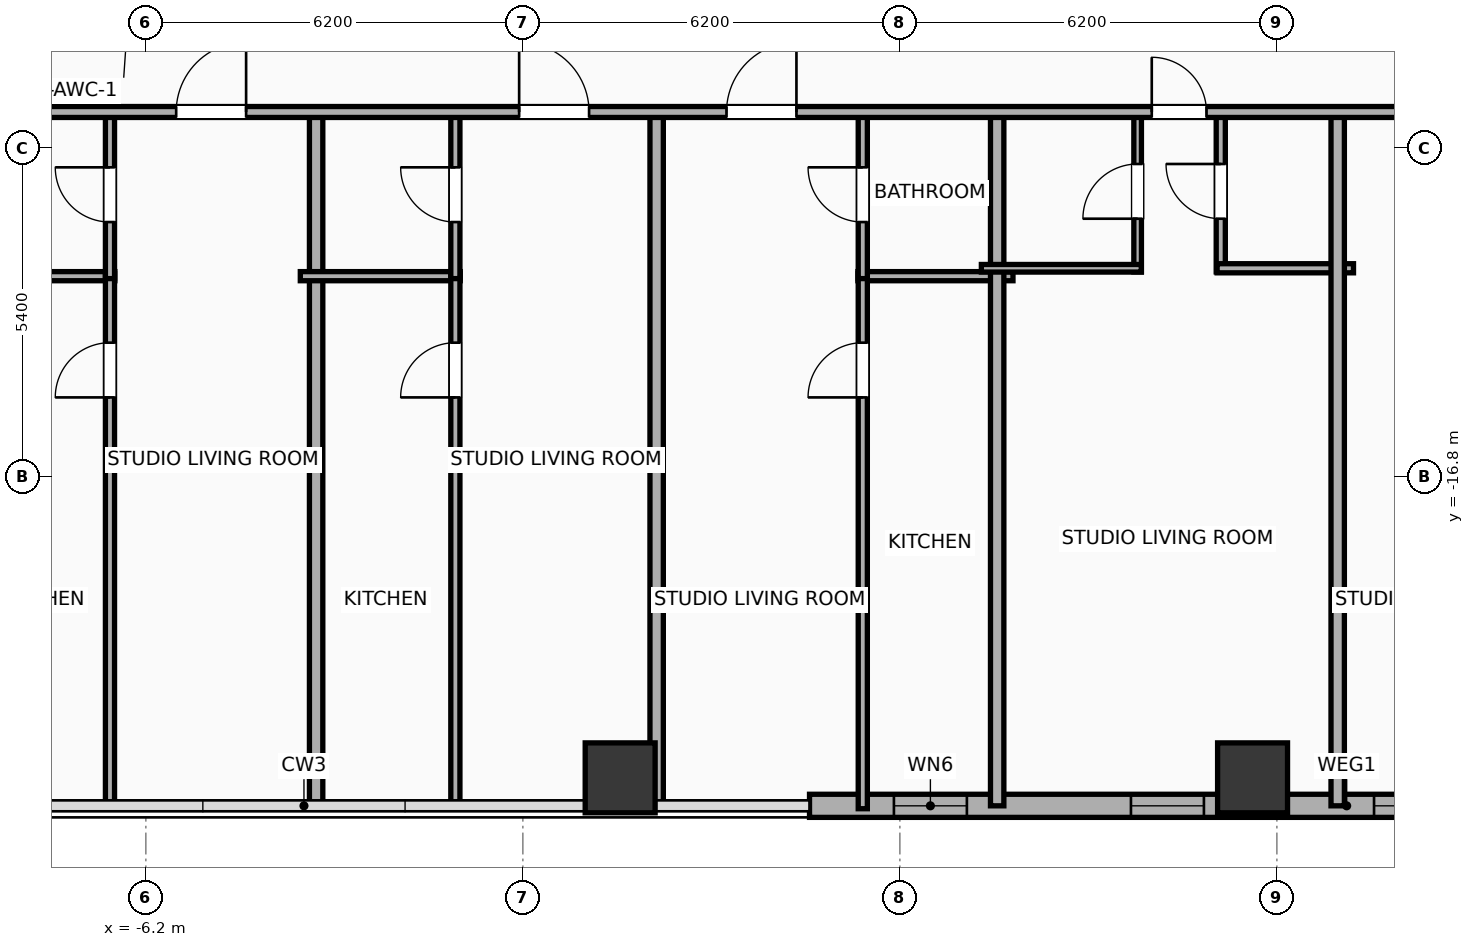
"""IFC4 building model, lengths in metres.
Left out: names, types, materials, properties, quantities, classifications, styles, units other than length and angle.
Written with IfcOpenShell. Run it as: python <this file> out.ifc"""

import sys

from ifc_helpers import new_model, si_unit, direction, frame, frame_2d, origin, origin_2d, place, context, subcontext, project, spatial, rectangle, hollow_rectangle, extrude, element, fill, save


model = new_model("IFC4")
c1 = context("Model", 3, precision=1e-05, world=origin(), true_north=direction((0.0, 1.0)))
c2 = subcontext(c1, "Body", "Model", "MODEL_VIEW")
j1 = project(units=[si_unit("LENGTHUNIT", "METRE"), si_unit("PLANEANGLEUNIT", "RADIAN")], contexts=[c1])
p1 = place(None, origin())
s1 = spatial("IfcSite", under=j1, at=p1, CompositionType="ELEMENT")
p2 = place(p1, origin())
s2 = spatial("IfcBuilding", under=s1, at=p2, CompositionType="ELEMENT")
p3 = place(p2, frame((0.0, 0.0, 61.1)))
s3 = spatial("IfcBuildingStorey", under=s2, at=p3, CompositionType="ELEMENT", Elevation=61.1)
for number, where, z_axis, x_axis in (
    (1, (1.6, -21.75, 0.0), (0.0, 0.0, 1.0), (1.0, 0.0, 0.0)),
    (2, (12.0, -21.75, 0.0), (0.0, 0.0, 1.0), (1.0, 0.0, 0.0)),
):
    element("IfcColumn", number, at=place(p3, frame(where, z_axis=z_axis, x_axis=x_axis)), inside=s3, PredefinedType="COLUMN", context=c2, shape_type="SweptSolid", body=[
        extrude(hollow_rectangle(XDim=1.15, YDim=1.15, WallThickness=0.04, at=origin_2d()), origin(), (0.0, 0.0, 1.0), 3.9),
    ])
p4 = place(p3, frame((22.381, -22.21, 0.0), z_axis=(0.0, 0.0, 1.0), x_axis=(-1.0, 0.0, 0.0)))
e3 = element("IfcWall", 3, at=p4, inside=s3, PredefinedType="ELEMENTEDWALL", context=c2, shape_type="SweptSolid", body=[
    extrude(rectangle(XDim=17.667, YDim=0.38, at=frame_2d((8.833, 0.0))), origin(), (0.0, 0.0, 1.0), 3.65),
])
p5 = place(p4, frame((5.984, 0.0, 0.75)))
e4 = element("IfcOpeningElement", 4, at=p5, cuts=e3, PredefinedType="OPENING", context=c2, shape_type="SweptSolid", body=[
    extrude(rectangle(XDim=2.4, YDim=2.1, at=frame_2d((1.2, 1.05))), frame((0.0, 0.2, 0.0), z_axis=(0.0, -1.0, 0.0), x_axis=(1.0, 0.0, 0.0)), (0.0, 0.0, 1.0), 0.4),
])
p6 = place(p4, frame((15.079, 0.0, 0.75)))
e5 = element("IfcOpeningElement", 5, at=p6, cuts=e3, PredefinedType="OPENING", context=c2, shape_type="SweptSolid", body=[
    extrude(rectangle(XDim=1.2, YDim=2.05, at=frame_2d((0.6, 1.025))), frame((0.0, 0.2, 0.0), z_axis=(0.0, -1.0, 0.0), x_axis=(1.0, 0.0, 0.0)), (0.0, 0.0, 1.0), 0.4),
])
p7 = place(p4, frame((11.181, 0.0, 0.75)))
e6 = element("IfcOpeningElement", 6, at=p7, cuts=e3, PredefinedType="OPENING", context=c2, shape_type="SweptSolid", body=[
    extrude(rectangle(XDim=1.2, YDim=2.05, at=frame_2d((0.6, 1.025))), frame((0.0, 0.2, 0.0), z_axis=(0.0, -1.0, 0.0), x_axis=(1.0, 0.0, 0.0)), (0.0, 0.0, 1.0), 0.4),
])
p8 = place(p4, frame((3.886, 0.0, 0.75)))
e7 = element("IfcOpeningElement", 7, at=p8, cuts=e3, PredefinedType="OPENING", context=c2, shape_type="SweptSolid", body=[
    extrude(rectangle(XDim=1.2, YDim=2.05, at=frame_2d((0.6, 1.025))), frame((0.0, 0.2, 0.0), z_axis=(0.0, -1.0, 0.0), x_axis=(1.0, 0.0, 0.0)), (0.0, 0.0, 1.0), 0.4),
])
p9 = place(p4, frame((1.536, 0.0, 0.75)))
e8 = element("IfcOpeningElement", 8, at=p9, cuts=e3, PredefinedType="OPENING", context=c2, shape_type="SweptSolid", body=[
    extrude(rectangle(XDim=1.2, YDim=2.05, at=frame_2d((0.6, 1.025))), frame((0.0, 0.2, 0.0), z_axis=(0.0, -1.0, 0.0), x_axis=(1.0, 0.0, 0.0)), (0.0, 0.0, 1.0), 0.4),
])
p10 = place(p3, frame((-9.26, -13.5, 0.0), z_axis=(0.0, 0.0, 1.0), x_axis=(1.0, 0.0, 0.0)))
e9 = element("IfcWall", 9, at=p10, inside=s3, PredefinedType="PLUMBINGWALL", context=c2, shape_type="SweptSolid", body=[
    extrude(rectangle(XDim=2.55, YDim=0.15, at=frame_2d((1.275, 0.0))), origin(), (0.0, 0.0, 1.0), 3.65),
])
p11 = place(p3, frame((-6.79, -22.258, 0.0), z_axis=(0.0, 0.0, 1.0), x_axis=(0.0, 1.0, 0.0)))
e10 = element("IfcWall", 10, at=p11, inside=s3, PredefinedType="PLUMBINGWALL", context=c2, shape_type="SweptSolid", body=[
    extrude(rectangle(XDim=8.798, YDim=0.15, at=frame_2d((4.399, 0.0))), origin(), (0.0, 0.0, 1.0), 3.65),
])
p12 = place(p11, frame((6.764, 0.0, 0.0)))
e11 = element("IfcOpeningElement", 11, at=p12, cuts=e10, PredefinedType="OPENING", context=c2, shape_type="SweptSolid", body=[
    extrude(rectangle(XDim=0.9, YDim=2.05, at=frame_2d((0.45, 1.025))), frame((0.0, 0.085, 0.0), z_axis=(0.0, -1.0, 0.0), x_axis=(1.0, 0.0, 0.0)), (0.0, 0.0, 1.0), 0.17),
])
p13 = place(p3, frame((-6.79, -13.54, 0.0), z_axis=(0.0, 0.0, 1.0), x_axis=(0.0, 1.0, 0.0)))
e12 = element("IfcWall", 12, at=p13, inside=s3, PredefinedType="PLUMBINGWALL", context=c2, shape_type="SweptSolid", body=[
    extrude(rectangle(XDim=2.76, YDim=0.15, at=frame_2d((1.38, 0.0))), origin(), (0.0, 0.0, 1.0), 3.65),
])
p14 = place(p13, frame((0.93, 0.0, 0.0)))
e13 = element("IfcOpeningElement", 13, at=p14, cuts=e12, PredefinedType="OPENING", context=c2, shape_type="SweptSolid", body=[
    extrude(rectangle(XDim=0.9, YDim=2.05, at=frame_2d((0.45, 1.025))), frame((0.0, 0.085, 0.0), z_axis=(0.0, -1.0, 0.0), x_axis=(1.0, 0.0, 0.0)), (0.0, 0.0, 1.0), 0.17),
])
p15 = place(p3, frame((-3.4, -22.21, 0.0), z_axis=(0.0, 0.0, 1.0), x_axis=(0.0, 1.0, 0.0)))
e14 = element("IfcWall", 14, at=p15, inside=s3, PredefinedType="PARTITIONING", context=c2, shape_type="SweptSolid", body=[
    extrude(rectangle(XDim=11.49, YDim=0.22, at=frame_2d((5.745, 0.0))), origin(), (0.0, 0.0, 1.0), 3.65),
])
p16 = place(p3, frame((-3.66, -13.5, 0.0), z_axis=(0.0, 0.0, 1.0), x_axis=(1.0, 0.0, 0.0)))
e15 = element("IfcWall", 15, at=p16, inside=s3, PredefinedType="PLUMBINGWALL", context=c2, shape_type="SweptSolid", body=[
    extrude(rectangle(XDim=2.63, YDim=0.15, at=frame_2d((1.315, 0.0))), origin(), (0.0, 0.0, 1.0), 3.65),
])
p17 = place(p3, frame((-1.11, -22.258, 0.0), z_axis=(0.0, 0.0, 1.0), x_axis=(0.0, 1.0, 0.0)))
e16 = element("IfcWall", 16, at=p17, inside=s3, PredefinedType="PLUMBINGWALL", context=c2, shape_type="SweptSolid", body=[
    extrude(rectangle(XDim=8.798, YDim=0.15, at=frame_2d((4.399, 0.0))), origin(), (0.0, 0.0, 1.0), 3.65),
])
p18 = place(p17, frame((6.764, 0.0, 0.0)))
e17 = element("IfcOpeningElement", 17, at=p18, cuts=e16, PredefinedType="OPENING", context=c2, shape_type="SweptSolid", body=[
    extrude(rectangle(XDim=0.9, YDim=2.05, at=frame_2d((0.45, 1.025))), frame((0.0, 0.085, 0.0), z_axis=(0.0, -1.0, 0.0), x_axis=(1.0, 0.0, 0.0)), (0.0, 0.0, 1.0), 0.17),
])
p19 = place(p3, frame((-1.11, -13.54, 0.0), z_axis=(0.0, 0.0, 1.0), x_axis=(0.0, 1.0, 0.0)))
e18 = element("IfcWall", 18, at=p19, inside=s3, PredefinedType="PLUMBINGWALL", context=c2, shape_type="SweptSolid", body=[
    extrude(rectangle(XDim=2.76, YDim=0.15, at=frame_2d((1.38, 0.0))), origin(), (0.0, 0.0, 1.0), 3.65),
])
p20 = place(p19, frame((0.93, 0.0, 0.0)))
e19 = element("IfcOpeningElement", 19, at=p20, cuts=e18, PredefinedType="OPENING", context=c2, shape_type="SweptSolid", body=[
    extrude(rectangle(XDim=0.9, YDim=2.05, at=frame_2d((0.45, 1.025))), frame((0.0, 0.085, 0.0), z_axis=(0.0, -1.0, 0.0), x_axis=(1.0, 0.0, 0.0)), (0.0, 0.0, 1.0), 0.17),
])
p21 = place(p3, frame((2.2, -22.21, 0.0), z_axis=(0.0, 0.0, 1.0), x_axis=(0.0, 1.0, 0.0)))
e20 = element("IfcWall", 20, at=p21, inside=s3, PredefinedType="PARTITIONING", context=c2, shape_type="SweptSolid", body=[
    extrude(rectangle(XDim=11.49, YDim=0.22, at=frame_2d((5.745, 0.0))), origin(), (0.0, 0.0, 1.0), 2.94),
])
p22 = place(p3, frame((5.51, -13.5, 0.0), z_axis=(0.0, 0.0, 1.0), x_axis=(1.0, 0.0, 0.0)))
e21 = element("IfcWall", 21, at=p22, inside=s3, PredefinedType="PLUMBINGWALL", context=c2, shape_type="SweptSolid", body=[
    extrude(rectangle(XDim=2.55, YDim=0.15, at=frame_2d((1.275, 0.0))), origin(), (0.0, 0.0, 1.0), 3.65),
])
p23 = place(p3, frame((5.59, -22.258, 0.0), z_axis=(0.0, 0.0, 1.0), x_axis=(0.0, 1.0, 0.0)))
e22 = element("IfcWall", 22, at=p23, inside=s3, PredefinedType="PLUMBINGWALL", context=c2, shape_type="SweptSolid", body=[
    extrude(rectangle(XDim=8.798, YDim=0.15, at=frame_2d((4.399, 0.0))), origin(), (0.0, 0.0, 1.0), 3.65),
])
p24 = place(p23, frame((6.764, 0.0, 0.0)))
e23 = element("IfcOpeningElement", 23, at=p24, cuts=e22, PredefinedType="OPENING", context=c2, shape_type="SweptSolid", body=[
    extrude(rectangle(XDim=0.9, YDim=2.05, at=frame_2d((0.45, 1.025))), frame((0.0, 0.085, 0.0), z_axis=(0.0, -1.0, 0.0), x_axis=(1.0, 0.0, 0.0)), (0.0, 0.0, 1.0), 0.17),
])
p25 = place(p3, frame((5.59, -13.54, 0.0), z_axis=(0.0, 0.0, 1.0), x_axis=(0.0, 1.0, 0.0)))
e24 = element("IfcWall", 24, at=p25, inside=s3, PredefinedType="PLUMBINGWALL", context=c2, shape_type="SweptSolid", body=[
    extrude(rectangle(XDim=2.76, YDim=0.15, at=frame_2d((1.38, 0.0))), origin(), (0.0, 0.0, 1.0), 3.65),
])
p26 = place(p25, frame((0.93, 0.0, 0.0)))
e25 = element("IfcOpeningElement", 25, at=p26, cuts=e24, PredefinedType="OPENING", context=c2, shape_type="SweptSolid", body=[
    extrude(rectangle(XDim=0.9, YDim=2.05, at=frame_2d((0.45, 1.025))), frame((0.0, 0.085, 0.0), z_axis=(0.0, -1.0, 0.0), x_axis=(1.0, 0.0, 0.0)), (0.0, 0.0, 1.0), 0.17),
])
p27 = place(p3, frame((7.8, -22.21, 0.0), z_axis=(0.0, 0.0, 1.0), x_axis=(0.0, 1.0, 0.0)))
e26 = element("IfcWall", 26, at=p27, inside=s3, PredefinedType="PARTITIONING", context=c2, shape_type="SweptSolid", body=[
    extrude(rectangle(XDim=11.49, YDim=0.22, at=frame_2d((5.745, 0.0))), origin(), (0.0, 0.0, 1.0), 3.65),
])
p28 = place(p3, frame((10.11, -13.43, 0.0), z_axis=(0.0, 0.0, 1.0), x_axis=(0.0, 1.0, 0.0)))
e27 = element("IfcWall", 27, at=p28, inside=s3, PredefinedType="PARTITIONING", context=c2, shape_type="SweptSolid", body=[
    extrude(rectangle(XDim=2.65, YDim=0.125, at=frame_2d((1.325, 0.0))), origin(), (0.0, 0.0, 1.0), 3.65),
])
p29 = place(p28, frame((0.875, 0.0, 0.0)))
e28 = element("IfcOpeningElement", 28, at=p29, cuts=e27, PredefinedType="OPENING", context=c2, shape_type="SweptSolid", body=[
    extrude(rectangle(XDim=0.9, YDim=2.05, at=frame_2d((0.45, 1.025))), frame((0.0, 0.073, 0.0), z_axis=(0.0, -1.0, 0.0), x_axis=(1.0, 0.0, 0.0)), (0.0, 0.0, 1.0), 0.145),
])
p30 = place(p3, frame((11.477, -13.43, 0.0), z_axis=(0.0, 0.0, 1.0), x_axis=(0.0, 1.0, 0.0)))
e29 = element("IfcWall", 29, at=p30, inside=s3, PredefinedType="PLUMBINGWALL", context=c2, shape_type="SweptSolid", body=[
    extrude(rectangle(XDim=2.65, YDim=0.15, at=frame_2d((1.325, 0.0))), origin(), (0.0, 0.0, 1.0), 3.65),
])
p31 = place(p30, frame((0.875, 0.0, 0.0)))
e30 = element("IfcOpeningElement", 30, at=p31, cuts=e29, PredefinedType="OPENING", context=c2, shape_type="SweptSolid", body=[
    extrude(rectangle(XDim=0.9, YDim=2.05, at=frame_2d((0.45, 1.025))), frame((0.0, 0.085, 0.0), z_axis=(0.0, -1.0, 0.0), x_axis=(1.0, 0.0, 0.0)), (0.0, 0.0, 1.0), 0.17),
])
p32 = place(p3, frame((7.54, -13.37, 0.0), z_axis=(0.0, 0.0, 1.0), x_axis=(1.0, 0.0, 0.0)))
e31 = element("IfcWall", 31, at=p32, inside=s3, PredefinedType="PARTITIONING", context=c2, shape_type="SweptSolid", body=[
    extrude(rectangle(XDim=2.63, YDim=0.125, at=frame_2d((1.315, 0.0))), origin(), (0.0, 0.0, 1.0), 3.65),
])
p33 = place(p3, frame((11.417, -13.37, 0.0), z_axis=(0.0, 0.0, 1.0), x_axis=(1.0, 0.0, 0.0)))
e32 = element("IfcWall", 32, at=p33, inside=s3, PredefinedType="PLUMBINGWALL", context=c2, shape_type="SweptSolid", body=[
    extrude(rectangle(XDim=2.243, YDim=0.15, at=frame_2d((1.122, 0.0))), origin(), (0.0, 0.0, 1.0), 3.65),
])
p34 = place(p3, frame((13.4, -22.21, 0.0), z_axis=(0.0, 0.0, 1.0), x_axis=(0.0, 1.0, 0.0)))
e33 = element("IfcWall", 33, at=p34, inside=s3, PredefinedType="PARTITIONING", context=c2, shape_type="SweptSolid", body=[
    extrude(rectangle(XDim=11.49, YDim=0.22, at=frame_2d((5.745, 0.0))), origin(), (0.0, 0.0, 1.0), 3.65),
])
p35 = place(p3, frame((-33.41, -10.8, 0.0), z_axis=(0.0, 0.0, 1.0), x_axis=(1.0, 0.0, 0.0)))
e34 = element("IfcWall", 34, at=p35, inside=s3, PredefinedType="PARTITIONING", context=c2, shape_type="SweptSolid", body=[
    extrude(rectangle(XDim=59.62, YDim=0.18, at=frame_2d((29.81, 0.0))), origin(), (0.0, 0.0, 1.0), 3.65),
])
p36 = place(p35, frame((3.36, 0.0, 0.0)))
e35 = element("IfcOpeningElement", 35, at=p36, cuts=e34, PredefinedType="OPENING", context=c2, shape_type="SweptSolid", body=[
    extrude(rectangle(XDim=1.15, YDim=2.05, at=frame_2d((0.575, 1.025))), frame((0.0, 0.1, 0.0), z_axis=(0.0, -1.0, 0.0), x_axis=(1.0, 0.0, 0.0)), (0.0, 0.0, 1.0), 0.2),
])
p37 = place(p35, frame((10.908, 0.0, 0.0)))
e36 = element("IfcOpeningElement", 36, at=p37, cuts=e34, PredefinedType="OPENING", context=c2, shape_type="SweptSolid", body=[
    extrude(rectangle(XDim=1.15, YDim=2.05, at=frame_2d((0.575, 1.025))), frame((0.0, 0.1, 0.0), z_axis=(0.0, -1.0, 0.0), x_axis=(1.0, 0.0, 0.0)), (0.0, 0.0, 1.0), 0.2),
])
p38 = place(p35, frame((15.755, 0.0, 0.0)))
e37 = element("IfcOpeningElement", 37, at=p38, cuts=e34, PredefinedType="OPENING", context=c2, shape_type="SweptSolid", body=[
    extrude(rectangle(XDim=0.9, YDim=2.05, at=frame_2d((0.45, 1.025))), frame((0.0, 0.1, 0.0), z_axis=(0.0, -1.0, 0.0), x_axis=(1.0, 0.0, 0.0)), (0.0, 0.0, 1.0), 0.2),
])
p39 = place(p35, frame((22.11, 0.0, 0.0)))
e38 = element("IfcOpeningElement", 38, at=p39, cuts=e34, PredefinedType="OPENING", context=c2, shape_type="SweptSolid", body=[
    extrude(rectangle(XDim=1.15, YDim=2.05, at=frame_2d((0.575, 1.025))), frame((0.0, 0.1, 0.0), z_axis=(0.0, -1.0, 0.0), x_axis=(1.0, 0.0, 0.0)), (0.0, 0.0, 1.0), 0.2),
])
p40 = place(p35, frame((27.709, 0.0, 0.0)))
e39 = element("IfcOpeningElement", 39, at=p40, cuts=e34, PredefinedType="OPENING", context=c2, shape_type="SweptSolid", body=[
    extrude(rectangle(XDim=1.15, YDim=2.05, at=frame_2d((0.575, 1.025))), frame((0.0, 0.1, 0.0), z_axis=(0.0, -1.0, 0.0), x_axis=(1.0, 0.0, 0.0)), (0.0, 0.0, 1.0), 0.2),
])
p41 = place(p35, frame((33.349, 0.0, 0.0)))
e40 = element("IfcOpeningElement", 40, at=p41, cuts=e34, PredefinedType="OPENING", context=c2, shape_type="SweptSolid", body=[
    extrude(rectangle(XDim=1.15, YDim=2.05, at=frame_2d((0.575, 1.025))), frame((0.0, 0.1, 0.0), z_axis=(0.0, -1.0, 0.0), x_axis=(1.0, 0.0, 0.0)), (0.0, 0.0, 1.0), 0.2),
])
p42 = place(p35, frame((36.759, 0.0, 0.0)))
e41 = element("IfcOpeningElement", 41, at=p42, cuts=e34, PredefinedType="OPENING", context=c2, shape_type="SweptSolid", body=[
    extrude(rectangle(XDim=1.15, YDim=2.05, at=frame_2d((0.575, 1.025))), frame((0.0, 0.1, 0.0), z_axis=(0.0, -1.0, 0.0), x_axis=(1.0, 0.0, 0.0)), (0.0, 0.0, 1.0), 0.2),
])
p43 = place(p35, frame((43.752, 0.0, 0.0)))
e42 = element("IfcOpeningElement", 42, at=p43, cuts=e34, PredefinedType="OPENING", context=c2, shape_type="SweptSolid", body=[
    extrude(rectangle(XDim=0.9, YDim=2.05, at=frame_2d((0.45, 1.025))), frame((0.0, 0.1, 0.0), z_axis=(0.0, -1.0, 0.0), x_axis=(1.0, 0.0, 0.0)), (0.0, 0.0, 1.0), 0.2),
])
p44 = place(p35, frame((47.962, 0.0, 0.0)))
e43 = element("IfcOpeningElement", 43, at=p44, cuts=e34, PredefinedType="OPENING", context=c2, shape_type="SweptSolid", body=[
    extrude(rectangle(XDim=1.15, YDim=2.05, at=frame_2d((0.575, 1.025))), frame((0.0, 0.1, 0.0), z_axis=(0.0, -1.0, 0.0), x_axis=(1.0, 0.0, 0.0)), (0.0, 0.0, 1.0), 0.2),
])
p45 = place(p35, frame((55.641, 0.0, 0.0)))
e44 = element("IfcOpeningElement", 44, at=p45, cuts=e34, PredefinedType="OPENING", context=c2, shape_type="SweptSolid", body=[
    extrude(rectangle(XDim=1.15, YDim=2.05, at=frame_2d((0.575, 1.025))), frame((0.0, 0.1, 0.0), z_axis=(0.0, -1.0, 0.0), x_axis=(1.0, 0.0, 0.0)), (0.0, 0.0, 1.0), 0.2),
])
p46 = place(p5, origin())
e45 = element("IfcWindow", 45, at=p46, inside=s3, PartitioningType="SINGLE_PANEL", PredefinedType="WINDOW", context=c2, shape_type="SweptSolid", body=[
    extrude(rectangle(XDim=2.4, YDim=2.1, at=frame_2d((1.2, 1.05))), frame((0.0, 0.03, 0.0), z_axis=(0.0, -1.0, 0.0), x_axis=(1.0, 0.0, 0.0)), (0.0, 0.0, 1.0), 0.06),
])
fill(e4, e45)
p47 = place(p6, origin())
e46 = element("IfcWindow", 46, at=p47, inside=s3, PartitioningType="SINGLE_PANEL", PredefinedType="WINDOW", context=c2, shape_type="SweptSolid", body=[
    extrude(rectangle(XDim=1.2, YDim=2.05, at=frame_2d((0.6, 1.025))), frame((0.0, 0.03, 0.0), z_axis=(0.0, -1.0, 0.0), x_axis=(1.0, 0.0, 0.0)), (0.0, 0.0, 1.0), 0.06),
])
fill(e5, e46)
p48 = place(p7, origin())
e47 = element("IfcWindow", 47, at=p48, inside=s3, PartitioningType="SINGLE_PANEL", PredefinedType="WINDOW", context=c2, shape_type="SweptSolid", body=[
    extrude(rectangle(XDim=1.2, YDim=2.05, at=frame_2d((0.6, 1.025))), frame((0.0, 0.03, 0.0), z_axis=(0.0, -1.0, 0.0), x_axis=(1.0, 0.0, 0.0)), (0.0, 0.0, 1.0), 0.06),
])
fill(e6, e47)
p49 = place(p12, origin())
e48 = element("IfcDoor", 48, at=p49, inside=s3, OperationType="SINGLE_SWING_LEFT", PredefinedType="DOOR", context=c2, shape_type="SweptSolid", body=[
    extrude(rectangle(XDim=0.9, YDim=2.05, at=frame_2d((0.45, 1.025))), frame((0.0, 0.025, 0.0), z_axis=(0.0, -1.0, 0.0), x_axis=(1.0, 0.0, 0.0)), (0.0, 0.0, 1.0), 0.05),
])
fill(e11, e48)
p50 = place(p14, origin())
e49 = element("IfcDoor", 49, at=p50, inside=s3, OperationType="SINGLE_SWING_RIGHT", PredefinedType="DOOR", context=c2, shape_type="SweptSolid", body=[
    extrude(rectangle(XDim=0.9, YDim=2.05, at=frame_2d((0.45, 1.025))), frame((0.0, 0.025, 0.0), z_axis=(0.0, -1.0, 0.0), x_axis=(1.0, 0.0, 0.0)), (0.0, 0.0, 1.0), 0.05),
])
fill(e13, e49)
p51 = place(p18, origin())
e50 = element("IfcDoor", 50, at=p51, inside=s3, OperationType="SINGLE_SWING_LEFT", PredefinedType="DOOR", context=c2, shape_type="SweptSolid", body=[
    extrude(rectangle(XDim=0.9, YDim=2.05, at=frame_2d((0.45, 1.025))), frame((0.0, 0.025, 0.0), z_axis=(0.0, -1.0, 0.0), x_axis=(1.0, 0.0, 0.0)), (0.0, 0.0, 1.0), 0.05),
])
fill(e17, e50)
p52 = place(p20, origin())
e51 = element("IfcDoor", 51, at=p52, inside=s3, OperationType="SINGLE_SWING_RIGHT", PredefinedType="DOOR", context=c2, shape_type="SweptSolid", body=[
    extrude(rectangle(XDim=0.9, YDim=2.05, at=frame_2d((0.45, 1.025))), frame((0.0, 0.025, 0.0), z_axis=(0.0, -1.0, 0.0), x_axis=(1.0, 0.0, 0.0)), (0.0, 0.0, 1.0), 0.05),
])
fill(e19, e51)
p53 = place(p24, origin())
e52 = element("IfcDoor", 52, at=p53, inside=s3, OperationType="SINGLE_SWING_LEFT", PredefinedType="DOOR", context=c2, shape_type="SweptSolid", body=[
    extrude(rectangle(XDim=0.9, YDim=2.05, at=frame_2d((0.45, 1.025))), frame((0.0, 0.025, 0.0), z_axis=(0.0, -1.0, 0.0), x_axis=(1.0, 0.0, 0.0)), (0.0, 0.0, 1.0), 0.05),
])
fill(e23, e52)
p54 = place(p26, origin())
e53 = element("IfcDoor", 53, at=p54, inside=s3, OperationType="SINGLE_SWING_RIGHT", PredefinedType="DOOR", context=c2, shape_type="SweptSolid", body=[
    extrude(rectangle(XDim=0.9, YDim=2.05, at=frame_2d((0.45, 1.025))), frame((0.0, 0.025, 0.0), z_axis=(0.0, -1.0, 0.0), x_axis=(1.0, 0.0, 0.0)), (0.0, 0.0, 1.0), 0.05),
])
fill(e25, e53)
p55 = place(p29, origin())
e54 = element("IfcDoor", 54, at=p55, inside=s3, OperationType="SINGLE_SWING_LEFT", PredefinedType="DOOR", context=c2, shape_type="SweptSolid", body=[
    extrude(rectangle(XDim=0.9, YDim=2.05, at=frame_2d((0.45, 1.025))), frame((0.0, 0.025, 0.0), z_axis=(0.0, -1.0, 0.0), x_axis=(1.0, 0.0, 0.0)), (0.0, 0.0, 1.0), 0.05),
])
fill(e28, e54)
p56 = place(p31, origin())
e55 = element("IfcDoor", 55, at=p56, inside=s3, OperationType="SINGLE_SWING_RIGHT", PredefinedType="DOOR", context=c2, shape_type="SweptSolid", body=[
    extrude(rectangle(XDim=0.9, YDim=2.05, at=frame_2d((0.45, 1.025))), frame((0.0, 0.025, 0.0), z_axis=(0.0, -1.0, 0.0), x_axis=(1.0, 0.0, 0.0)), (0.0, 0.0, 1.0), 0.05),
])
fill(e30, e55)
p57 = place(p40, origin())
e56 = element("IfcDoor", 56, at=p57, inside=s3, OperationType="SINGLE_SWING_RIGHT", PredefinedType="DOOR", context=c2, shape_type="SweptSolid", body=[
    extrude(rectangle(XDim=1.15, YDim=2.05, at=frame_2d((0.575, 1.025))), frame((0.0, 0.025, 0.0), z_axis=(0.0, -1.0, 0.0), x_axis=(1.0, 0.0, 0.0)), (0.0, 0.0, 1.0), 0.05),
])
fill(e39, e56)
p58 = place(p41, origin())
e57 = element("IfcDoor", 57, at=p58, inside=s3, OperationType="SINGLE_SWING_LEFT", PredefinedType="DOOR", context=c2, shape_type="SweptSolid", body=[
    extrude(rectangle(XDim=1.15, YDim=2.05, at=frame_2d((0.575, 1.025))), frame((0.0, 0.025, 0.0), z_axis=(0.0, -1.0, 0.0), x_axis=(1.0, 0.0, 0.0)), (0.0, 0.0, 1.0), 0.05),
])
fill(e40, e57)
p59 = place(p42, origin())
e58 = element("IfcDoor", 58, at=p59, inside=s3, OperationType="SINGLE_SWING_RIGHT", PredefinedType="DOOR", context=c2, shape_type="SweptSolid", body=[
    extrude(rectangle(XDim=1.15, YDim=2.05, at=frame_2d((0.575, 1.025))), frame((0.0, 0.025, 0.0), z_axis=(0.0, -1.0, 0.0), x_axis=(1.0, 0.0, 0.0)), (0.0, 0.0, 1.0), 0.05),
])
fill(e41, e58)
p60 = place(p43, origin())
e59 = element("IfcDoor", 59, at=p60, inside=s3, OperationType="SINGLE_SWING_LEFT", PredefinedType="DOOR", context=c2, shape_type="SweptSolid", body=[
    extrude(rectangle(XDim=0.9, YDim=2.05, at=frame_2d((0.45, 1.025))), frame((0.0, 0.025, 0.0), z_axis=(0.0, -1.0, 0.0), x_axis=(1.0, 0.0, 0.0)), (0.0, 0.0, 1.0), 0.05),
])
fill(e42, e59)
save(model, sys.argv[1])
